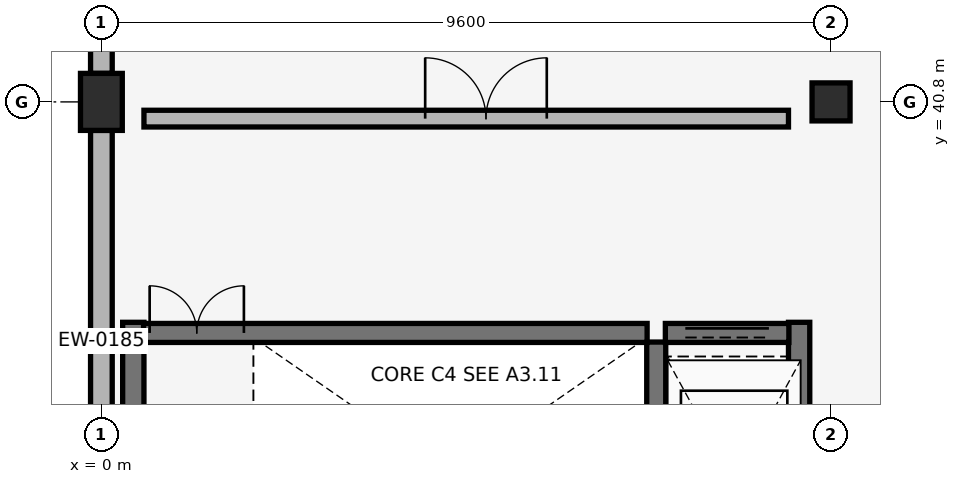
"""IFC4 building model, lengths in metres.
Left out: names, types, materials, properties, quantities, classifications, styles, units other than length and angle.
Written with IfcOpenShell. Run it as: python <this file> out.ifc"""

import sys

from ifc_helpers import new_model, si_unit, direction, frame, frame_2d, origin, origin_2d, place, context, subcontext, project, spatial, rectangle, extrude, element, fill, save


model = new_model("IFC4")
c1 = context("Model", 3, precision=1e-05, world=origin(), true_north=direction((0.0, 1.0)))
c2 = subcontext(c1, "Body", "Model", "MODEL_VIEW")
j1 = project(units=[si_unit("LENGTHUNIT", "METRE"), si_unit("PLANEANGLEUNIT", "RADIAN")], contexts=[c1])
p1 = place(None, origin())
s1 = spatial("IfcSite", under=j1, at=p1, CompositionType="ELEMENT")
p2 = place(p1, origin())
s2 = spatial("IfcBuilding", under=s1, at=p2, CompositionType="ELEMENT")
p3 = place(p2, frame((0.0, 0.0, 12.58)))
s3 = spatial("IfcBuildingStorey", under=s2, at=p3, CompositionType="ELEMENT", Elevation=12.58)
p4 = place(p3, frame((0.0, 40.8, 0.0), z_axis=(0.0, 0.0, 1.0), x_axis=(1.0, 0.0, 0.0)))
e1 = element("IfcColumn", 1, at=p4, inside=s3, PredefinedType="COLUMN", context=c2, shape_type="SweptSolid", body=[
    extrude(rectangle(XDim=0.55, YDim=0.75, at=origin_2d()), origin(), (0.0, 0.0, 1.0), 4.08),
])
p5 = place(p3, frame((9.6, 40.8, 0.0), z_axis=(0.0, 0.0, 1.0), x_axis=(1.0, 0.0, 0.0)))
e2 = element("IfcColumn", 2, at=p5, inside=s3, PredefinedType="COLUMN", context=c2, shape_type="SweptSolid", body=[
    extrude(rectangle(XDim=0.5, YDim=0.5, at=origin_2d()), origin(), (0.0, 0.0, 1.0), 4.08),
])
p6 = place(p3, frame((0.0, 40.425, 0.0), z_axis=(0.0, 0.0, 1.0), x_axis=(0.0, -1.0, 0.0)))
e3 = element("IfcWall", 3, at=p6, inside=s3, PredefinedType="SOLIDWALL", context=c2, shape_type="SweptSolid", body=[
    extrude(rectangle(XDim=6.45, YDim=0.285, at=frame_2d((3.225, 0.0))), origin(), (0.0, 0.0, 1.0), 3.06),
])
p7 = place(p3, frame((0.0, 47.625, 0.0), z_axis=(0.0, 0.0, 1.0), x_axis=(0.0, -1.0, 0.0)))
e4 = element("IfcWall", 4, at=p7, inside=s3, PredefinedType="SOLIDWALL", context=c2, shape_type="SweptSolid", body=[
    extrude(rectangle(XDim=6.45, YDim=0.285, at=frame_2d((3.225, 0.0))), origin(), (0.0, 0.0, 1.0), 3.06),
])
p8 = place(p7, frame((1.103, 0.0, 0.88)))
e5 = element("IfcOpeningElement", 5, at=p8, cuts=e4, PredefinedType="OPENING", context=c2, shape_type="SweptSolid", body=[
    extrude(rectangle(XDim=1.02, YDim=1.88, at=frame_2d((0.51, 0.94))), frame((0.0, 0.152, 0.0), z_axis=(0.0, -1.0, 0.0), x_axis=(1.0, 0.0, 0.0)), (0.0, 0.0, 1.0), 0.305),
])
p9 = place(p7, frame((2.715, 0.0, 0.88)))
e6 = element("IfcOpeningElement", 6, at=p9, cuts=e4, PredefinedType="OPENING", context=c2, shape_type="SweptSolid", body=[
    extrude(rectangle(XDim=1.02, YDim=1.88, at=frame_2d((0.51, 0.94))), frame((0.0, 0.152, 0.0), z_axis=(0.0, -1.0, 0.0), x_axis=(1.0, 0.0, 0.0)), (0.0, 0.0, 1.0), 0.305),
])
p10 = place(p7, frame((4.327, 0.0, 0.88)))
e7 = element("IfcOpeningElement", 7, at=p10, cuts=e4, PredefinedType="OPENING", context=c2, shape_type="SweptSolid", body=[
    extrude(rectangle(XDim=1.02, YDim=1.88, at=frame_2d((0.51, 0.94))), frame((0.0, 0.152, 0.0), z_axis=(0.0, -1.0, 0.0), x_axis=(1.0, 0.0, 0.0)), (0.0, 0.0, 1.0), 0.305),
])
for number, where, z_axis, x_axis in (
    (8, (0.42, 33.82, 0.0), (0.0, 0.0, 1.0), (0.0, 1.0, 0.0)),
    (9, (9.18, 33.82, 0.0), (0.0, 0.0, 1.0), (0.0, 1.0, 0.0)),
):
    element("IfcWall", number, at=place(p3, frame(where, z_axis=z_axis, x_axis=x_axis)), inside=s3, PredefinedType="SHEAR", context=c2, shape_type="SweptSolid", body=[
        extrude(rectangle(XDim=4.08, YDim=0.28, at=frame_2d((2.04, 0.0))), origin(), (0.0, 0.0, 1.0), 3.78),
    ])
p11 = place(p3, frame((7.3, 34.1, 0.0), z_axis=(0.0, 0.0, 1.0), x_axis=(0.0, 1.0, 0.0)))
e10 = element("IfcWall", 10, at=p11, inside=s3, PredefinedType="SHEAR", context=c2, shape_type="SweptSolid", body=[
    extrude(rectangle(XDim=3.54, YDim=0.25, at=frame_2d((1.77, 0.0))), origin(), (0.0, 0.0, 1.0), 3.78),
])
p12 = place(p3, frame((0.555, 37.76, 0.0), z_axis=(0.0, 0.0, 1.0), x_axis=(1.0, 0.0, 0.0)))
e11 = element("IfcWall", 11, at=p12, inside=s3, PredefinedType="SHEAR", context=c2, shape_type="SweptSolid", body=[
    extrude(rectangle(XDim=6.625, YDim=0.25, at=frame_2d((3.312, 0.0))), origin(), (0.0, 0.0, 1.0), 3.78),
])
p13 = place(p12, frame((0.08, 0.0, 0.0)))
e12 = element("IfcOpeningElement", 12, at=p13, cuts=e11, PredefinedType="OPENING", context=c2, shape_type="SweptSolid", body=[
    extrude(rectangle(XDim=1.24, YDim=2.15, at=frame_2d((0.62, 1.075))), frame((0.0, 0.135, 0.0), z_axis=(0.0, -1.0, 0.0), x_axis=(1.0, 0.0, 0.0)), (0.0, 0.0, 1.0), 0.27),
])
p14 = place(p3, frame((0.56, 40.58, 0.0), z_axis=(0.0, 0.0, 1.0), x_axis=(1.0, 0.0, 0.0)))
e13 = element("IfcWall", 13, at=p14, inside=s3, PredefinedType="PARTITIONING", context=c2, shape_type="SweptSolid", body=[
    extrude(rectangle(XDim=8.48, YDim=0.22, at=frame_2d((4.24, 0.0))), origin(), (0.0, 0.0, 1.0), 3.19),
])
p15 = place(p14, frame((3.7, 0.0, 0.0)))
e14 = element("IfcOpeningElement", 14, at=p15, cuts=e13, PredefinedType="OPENING", context=c2, shape_type="SweptSolid", body=[
    extrude(rectangle(XDim=1.6, YDim=2.2, at=frame_2d((0.8, 1.1))), frame((0.0, 0.12, 0.0), z_axis=(0.0, -1.0, 0.0), x_axis=(1.0, 0.0, 0.0)), (0.0, 0.0, 1.0), 0.24),
])
p16 = place(p3, frame((7.42, 37.76, 0.0), z_axis=(0.0, 0.0, 1.0), x_axis=(1.0, 0.0, 0.0)))
e15 = element("IfcWall", 15, at=p16, inside=s3, PredefinedType="SHEAR", context=c2, shape_type="SweptSolid", body=[
    extrude(rectangle(XDim=1.625, YDim=0.25, at=frame_2d((0.812, 0.0))), origin(), (0.0, 0.0, 1.0), 3.78),
])
p17 = place(p16, frame((0.262, 0.0, 0.0)))
e16 = element("IfcOpeningElement", 16, at=p17, cuts=e15, PredefinedType="OPENING", context=c2, shape_type="SweptSolid", body=[
    extrude(rectangle(XDim=1.1, YDim=2.15, at=frame_2d((0.55, 1.075))), frame((0.0, 0.135, 0.0), z_axis=(0.0, -1.0, 0.0), x_axis=(1.0, 0.0, 0.0)), (0.0, 0.0, 1.0), 0.27),
])
p18 = place(p13, origin())
e17 = element("IfcDoor", 17, at=p18, inside=s3, OperationType="DOUBLE_DOOR_SINGLE_SWING", PredefinedType="DOOR", context=c2, shape_type="SweptSolid", body=[
    extrude(rectangle(XDim=1.24, YDim=2.15, at=frame_2d((0.62, 1.075))), frame((0.0, 0.025, 0.0), z_axis=(0.0, -1.0, 0.0), x_axis=(1.0, 0.0, 0.0)), (0.0, 0.0, 1.0), 0.05),
])
fill(e12, e17)
p19 = place(p15, origin())
e18 = element("IfcDoor", 18, at=p19, inside=s3, OperationType="DOUBLE_DOOR_SINGLE_SWING", PredefinedType="DOOR", context=c2, shape_type="SweptSolid", body=[
    extrude(rectangle(XDim=1.6, YDim=2.2, at=frame_2d((0.8, 1.1))), frame((0.0, 0.025, 0.0), z_axis=(0.0, -1.0, 0.0), x_axis=(1.0, 0.0, 0.0)), (0.0, 0.0, 1.0), 0.05),
])
fill(e14, e18)
p20 = place(p17, origin())
e19 = element("IfcDoor", 19, at=p20, inside=s3, OperationType="DOUBLE_DOOR_SLIDING", PredefinedType="DOOR", context=c2, shape_type="SweptSolid", body=[
    extrude(rectangle(XDim=1.1, YDim=2.15, at=frame_2d((0.55, 1.075))), frame((0.0, 0.025, 0.0), z_axis=(0.0, -1.0, 0.0), x_axis=(1.0, 0.0, 0.0)), (0.0, 0.0, 1.0), 0.05),
])
fill(e16, e19)
save(model, sys.argv[1])
